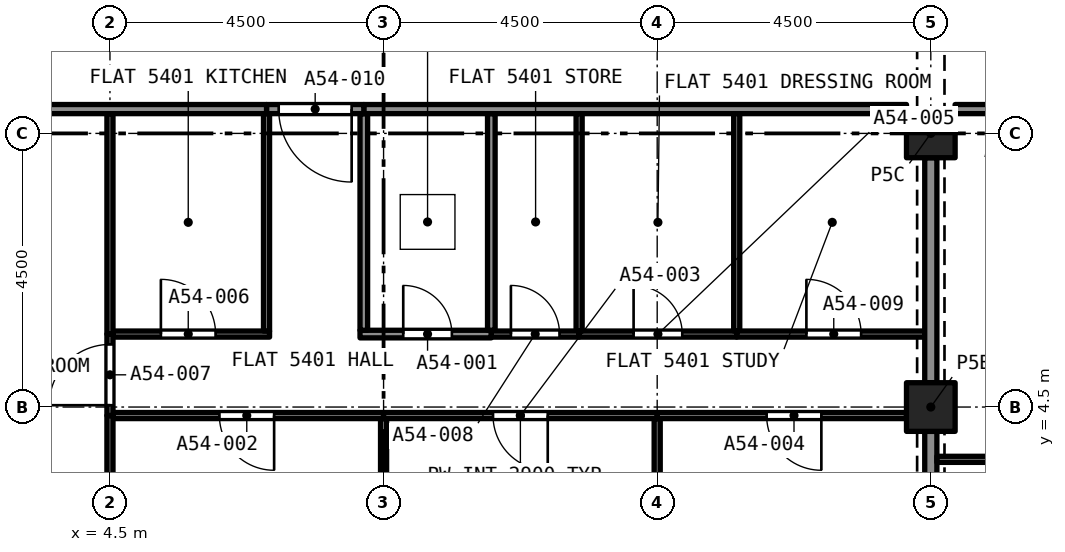
"""IFC4 building model, lengths in metres.
Left out: names, types, materials, properties, quantities, classifications, styles, units other than length and angle.
Written with IfcOpenShell. Run it as: python <this file> out.ifc"""

import sys

from ifc_helpers import new_model, si_unit, direction, frame, frame_2d, origin, origin_2d, place, context, subcontext, project, spatial, rectangle, extrude, element, fill, save


model = new_model("IFC4")
c1 = context("Model", 3, precision=1e-05, world=origin(), true_north=direction((0.0, 1.0)))
c2 = subcontext(c1, "Body", "Model", "MODEL_VIEW")
j1 = project(units=[si_unit("LENGTHUNIT", "METRE"), si_unit("PLANEANGLEUNIT", "RADIAN")], contexts=[c1])
p1 = place(None, origin())
s1 = spatial("IfcSite", under=j1, at=p1, CompositionType="ELEMENT")
p2 = place(p1, origin())
s2 = spatial("IfcBuilding", under=s1, at=p2, CompositionType="ELEMENT")
p3 = place(p2, frame((0.0, 0.0, 195.5)))
s3 = spatial("IfcBuildingStorey", under=s2, at=p3, CompositionType="ELEMENT", Elevation=195.5)
for number, where, z_axis, x_axis in (
    (1, (18.0, 4.5, 0.0), (0.0, 0.0, 1.0), (1.0, 0.0, 0.0)),
    (2, (18.0, 9.0, 0.0), (0.0, 0.0, 1.0), (1.0, 0.0, 0.0)),
):
    element("IfcColumn", number, at=place(p3, frame(where, z_axis=z_axis, x_axis=x_axis)), inside=s3, PredefinedType="COLUMN", context=c2, shape_type="SweptSolid", body=[
        extrude(rectangle(XDim=0.8, YDim=0.8, at=origin_2d()), origin(), (0.0, 0.0, 1.0), 3.2),
    ])
p4 = place(p3, frame((8.613, 5.7, 0.0), z_axis=(0.0, 0.0, 1.0), x_axis=(1.0, 0.0, 0.0)))
e3 = element("IfcWall", 3, at=p4, inside=s3, PredefinedType="PARTITIONING", context=c2, shape_type="SweptSolid", body=[
    extrude(rectangle(XDim=2.159, YDim=0.125, at=frame_2d((1.08, 0.0))), origin(), (0.0, 0.0, 1.0), 2.9),
])
p5 = place(p4, frame((0.711, 0.0, 0.0)))
e4 = element("IfcOpeningElement", 4, at=p5, cuts=e3, PredefinedType="OPENING", context=c2, shape_type="SweptSolid", body=[
    extrude(rectangle(XDim=0.8, YDim=2.1, at=frame_2d((0.4, 1.05))), frame((0.0, 0.073, 0.0), z_axis=(0.0, -1.0, 0.0), x_axis=(1.0, 0.0, 0.0)), (0.0, 0.0, 1.0), 0.145),
])
for number, where, z_axis, x_axis in (
    (5, (8.675, 5.762, 0.0), (0.0, 0.0, 1.0), (0.0, 1.0, 0.0)),
    (6, (10.772, 5.762, 0.0), (0.0, 0.0, 1.0), (0.0, 1.0, 0.0)),
):
    element("IfcWall", number, at=place(p3, frame(where, z_axis=z_axis, x_axis=x_axis)), inside=s3, PredefinedType="PARTITIONING", context=c2, shape_type="SweptSolid", body=[
        extrude(rectangle(XDim=3.562, YDim=0.125, at=frame_2d((1.781, 0.0))), origin(), (0.0, 0.0, 1.0), 2.9),
    ])
p6 = place(p3, frame((8.675, 9.4, 0.0), z_axis=(0.0, 0.0, 1.0), x_axis=(1.0, 0.0, 0.0)))
e7 = element("IfcWall", 7, at=p6, inside=s3, PredefinedType="PARTITIONING", context=c2, shape_type="SweptSolid", body=[
    extrude(rectangle(XDim=8.925, YDim=0.15, at=frame_2d((4.462, 0.0))), origin(), (0.0, 0.0, 1.0), 2.9),
])
p7 = place(p3, frame((9.0, 0.4, 0.0), z_axis=(0.0, 0.0, 1.0), x_axis=(0.0, 1.0, 0.0)))
e8 = element("IfcWall", 8, at=p7, inside=s3, PredefinedType="PARTITIONING", context=c2, shape_type="SweptSolid", body=[
    extrude(rectangle(XDim=3.91, YDim=0.1, at=frame_2d((1.955, 0.0))), origin(), (0.0, 0.0, 1.0), 2.9),
])
p8 = place(p3, frame((9.0, 4.36, 0.0), z_axis=(0.0, 0.0, 1.0), x_axis=(-1.0, 0.0, 0.0)))
e9 = element("IfcWall", 9, at=p8, inside=s3, PredefinedType="PARTITIONING", context=c2, shape_type="SweptSolid", body=[
    extrude(rectangle(XDim=4.45, YDim=0.1, at=frame_2d((2.225, 0.0))), origin(), (0.0, 0.0, 1.0), 2.9),
])
p9 = place(p8, frame((1.8, 0.0, 0.0)))
e10 = element("IfcOpeningElement", 10, at=p9, cuts=e9, PredefinedType="OPENING", context=c2, shape_type="SweptSolid", body=[
    extrude(rectangle(XDim=0.9, YDim=2.1, at=frame_2d((0.45, 1.05))), frame((0.0, 0.06, 0.0), z_axis=(0.0, -1.0, 0.0), x_axis=(1.0, 0.0, 0.0)), (0.0, 0.0, 1.0), 0.12),
])
p10 = place(p3, frame((4.5, 0.433, 0.0), z_axis=(0.0, 0.0, 1.0), x_axis=(0.0, 1.0, 0.0)))
e11 = element("IfcWall", 11, at=p10, inside=s3, PredefinedType="PARTITIONING", context=c2, shape_type="SweptSolid", body=[
    extrude(rectangle(XDim=3.927, YDim=0.1, at=frame_2d((1.964, 0.0))), origin(), (0.0, 0.0, 1.0), 2.9),
])
p11 = place(p3, frame((13.5, 0.4, 0.0), z_axis=(0.0, 0.0, 1.0), x_axis=(0.0, 1.0, 0.0)))
e12 = element("IfcWall", 12, at=p11, inside=s3, PredefinedType="PARTITIONING", context=c2, shape_type="SweptSolid", body=[
    extrude(rectangle(XDim=3.91, YDim=0.1, at=frame_2d((1.955, 0.0))), origin(), (0.0, 0.0, 1.0), 2.9),
])
p12 = place(p3, frame((13.5, 4.36, 0.0), z_axis=(0.0, 0.0, 1.0), x_axis=(-1.0, 0.0, 0.0)))
e13 = element("IfcWall", 13, at=p12, inside=s3, PredefinedType="PARTITIONING", context=c2, shape_type="SweptSolid", body=[
    extrude(rectangle(XDim=4.5, YDim=0.1, at=frame_2d((2.25, 0.0))), origin(), (0.0, 0.0, 1.0), 2.9),
])
p13 = place(p12, frame((1.8, 0.0, 0.0)))
e14 = element("IfcOpeningElement", 14, at=p13, cuts=e13, PredefinedType="OPENING", context=c2, shape_type="SweptSolid", body=[
    extrude(rectangle(XDim=0.9, YDim=2.1, at=frame_2d((0.45, 1.05))), frame((0.0, 0.06, 0.0), z_axis=(0.0, -1.0, 0.0), x_axis=(1.0, 0.0, 0.0)), (0.0, 0.0, 1.0), 0.12),
])
p14 = place(p3, frame((17.6, 4.36, 0.0), z_axis=(0.0, 0.0, 1.0), x_axis=(-1.0, 0.0, 0.0)))
e15 = element("IfcWall", 15, at=p14, inside=s3, PredefinedType="PARTITIONING", context=c2, shape_type="SweptSolid", body=[
    extrude(rectangle(XDim=4.1, YDim=0.1, at=frame_2d((2.05, 0.0))), origin(), (0.0, 0.0, 1.0), 2.9),
])
p15 = place(p14, frame((1.4, 0.0, 0.0)))
e16 = element("IfcOpeningElement", 16, at=p15, cuts=e15, PredefinedType="OPENING", context=c2, shape_type="SweptSolid", body=[
    extrude(rectangle(XDim=0.9, YDim=2.1, at=frame_2d((0.45, 1.05))), frame((0.0, 0.06, 0.0), z_axis=(0.0, -1.0, 0.0), x_axis=(1.0, 0.0, 0.0)), (0.0, 0.0, 1.0), 0.12),
])
p16 = place(p3, frame((18.0, 0.4, 0.0), z_axis=(0.0, 0.0, 1.0), x_axis=(0.0, 1.0, 0.0)))
e17 = element("IfcWall", 17, at=p16, inside=s3, PredefinedType="PARTITIONING", context=c2, shape_type="SweptSolid", body=[
    extrude(rectangle(XDim=3.7, YDim=0.2, at=frame_2d((1.85, 0.0))), origin(), (0.0, 0.0, 1.0), 2.38),
])
p17 = place(p3, frame((12.216, 5.7, 0.0), z_axis=(0.0, 0.0, 1.0), x_axis=(1.0, 0.0, 0.0)))
e18 = element("IfcWall", 18, at=p17, inside=s3, PredefinedType="PARTITIONING", context=c2, shape_type="SweptSolid", body=[
    extrude(rectangle(XDim=2.591, YDim=0.1, at=frame_2d((1.296, 0.0))), origin(), (0.0, 0.0, 1.0), 2.9),
])
p18 = place(p17, frame((0.896, 0.0, 0.0)))
e19 = element("IfcOpeningElement", 19, at=p18, cuts=e18, PredefinedType="OPENING", context=c2, shape_type="SweptSolid", body=[
    extrude(rectangle(XDim=0.8, YDim=2.1, at=frame_2d((0.4, 1.05))), frame((0.0, 0.06, 0.0), z_axis=(0.0, -1.0, 0.0), x_axis=(1.0, 0.0, 0.0)), (0.0, 0.0, 1.0), 0.12),
])
for number, where, z_axis, x_axis in (
    (20, (12.216, 5.75, 0.0), (0.0, 0.0, 1.0), (0.0, 1.0, 0.0)),
    (21, (14.808, 5.75, 0.0), (0.0, 0.0, 1.0), (0.0, 1.0, 0.0)),
):
    element("IfcWall", number, at=place(p3, frame(where, z_axis=z_axis, x_axis=x_axis)), inside=s3, PredefinedType="PARTITIONING", context=c2, shape_type="SweptSolid", body=[
        extrude(rectangle(XDim=3.575, YDim=0.1, at=frame_2d((1.788, 0.0))), origin(), (0.0, 0.0, 1.0), 2.9),
    ])
p19 = place(p3, frame((4.55, 5.7, 0.0), z_axis=(0.0, 0.0, 1.0), x_axis=(1.0, 0.0, 0.0)))
e22 = element("IfcWall", 22, at=p19, inside=s3, PredefinedType="PARTITIONING", context=c2, shape_type="SweptSolid", body=[
    extrude(rectangle(XDim=2.575, YDim=0.1, at=frame_2d((1.288, 0.0))), origin(), (0.0, 0.0, 1.0), 2.9),
])
p20 = place(p19, frame((0.788, 0.0, 0.0)))
e23 = element("IfcOpeningElement", 23, at=p20, cuts=e22, PredefinedType="OPENING", context=c2, shape_type="SweptSolid", body=[
    extrude(rectangle(XDim=0.9, YDim=2.1, at=frame_2d((0.45, 1.05))), frame((0.0, 0.06, 0.0), z_axis=(0.0, -1.0, 0.0), x_axis=(1.0, 0.0, 0.0)), (0.0, 0.0, 1.0), 0.12),
])
p21 = place(p3, frame((7.075, 5.75, 0.0), z_axis=(0.0, 0.0, 1.0), x_axis=(0.0, 1.0, 0.0)))
e24 = element("IfcWall", 24, at=p21, inside=s3, PredefinedType="PARTITIONING", context=c2, shape_type="SweptSolid", body=[
    extrude(rectangle(XDim=3.575, YDim=0.1, at=frame_2d((1.788, 0.0))), origin(), (0.0, 0.0, 1.0), 2.9),
])
p22 = place(p3, frame((4.5, 4.36, 0.0), z_axis=(0.0, 0.0, 1.0), x_axis=(0.0, 1.0, 0.0)))
e25 = element("IfcWall", 25, at=p22, inside=s3, PredefinedType="PARTITIONING", context=c2, shape_type="SweptSolid", body=[
    extrude(rectangle(XDim=1.34, YDim=0.1, at=frame_2d((0.67, 0.0))), origin(), (0.0, 0.0, 1.0), 2.9),
])
p23 = place(p22, frame((0.17, 0.0, 0.0)))
e26 = element("IfcOpeningElement", 26, at=p23, cuts=e25, PredefinedType="OPENING", context=c2, shape_type="SweptSolid", body=[
    extrude(rectangle(XDim=1.0, YDim=2.1, at=frame_2d((0.5, 1.05))), frame((0.0, 0.06, 0.0), z_axis=(0.0, -1.0, 0.0), x_axis=(1.0, 0.0, 0.0)), (0.0, 0.0, 1.0), 0.12),
])
p24 = place(p3, frame((10.772, 5.7, 0.0), z_axis=(0.0, 0.0, 1.0), x_axis=(1.0, 0.0, 0.0)))
e27 = element("IfcWall", 27, at=p24, inside=s3, PredefinedType="PARTITIONING", context=c2, shape_type="SweptSolid", body=[
    extrude(rectangle(XDim=1.445, YDim=0.1, at=frame_2d((0.722, 0.0))), origin(), (0.0, 0.0, 1.0), 2.9),
])
p25 = place(p24, frame((0.322, 0.0, 0.0)))
e28 = element("IfcOpeningElement", 28, at=p25, cuts=e27, PredefinedType="OPENING", context=c2, shape_type="SweptSolid", body=[
    extrude(rectangle(XDim=0.8, YDim=2.1, at=frame_2d((0.4, 1.05))), frame((0.0, 0.06, 0.0), z_axis=(0.0, -1.0, 0.0), x_axis=(1.0, 0.0, 0.0)), (0.0, 0.0, 1.0), 0.12),
])
p26 = place(p3, frame((14.808, 5.7, 0.0), z_axis=(0.0, 0.0, 1.0), x_axis=(1.0, 0.0, 0.0)))
e29 = element("IfcWall", 29, at=p26, inside=s3, PredefinedType="PARTITIONING", context=c2, shape_type="SweptSolid", body=[
    extrude(rectangle(XDim=3.092, YDim=0.1, at=frame_2d((1.546, 0.0))), origin(), (0.0, 0.0, 1.0), 2.9),
])
p27 = place(p26, frame((1.146, 0.0, 0.0)))
e30 = element("IfcOpeningElement", 30, at=p27, cuts=e29, PredefinedType="OPENING", context=c2, shape_type="SweptSolid", body=[
    extrude(rectangle(XDim=0.9, YDim=2.1, at=frame_2d((0.45, 1.05))), frame((0.0, 0.06, 0.0), z_axis=(0.0, -1.0, 0.0), x_axis=(1.0, 0.0, 0.0)), (0.0, 0.0, 1.0), 0.12),
])
p28 = place(p3, frame((18.0, 4.9, 0.0), z_axis=(0.0, 0.0, 1.0), x_axis=(0.0, 1.0, 0.0)))
e31 = element("IfcWall", 31, at=p28, inside=s3, PredefinedType="PARTITIONING", context=c2, shape_type="SweptSolid", body=[
    extrude(rectangle(XDim=3.7, YDim=0.2, at=frame_2d((1.85, 0.0))), origin(), (0.0, 0.0, 1.0), 2.38),
])
p29 = place(p3, frame((8.675, 9.4, 0.0), z_axis=(0.0, 0.0, 1.0), x_axis=(-1.0, 0.0, 0.0)))
e32 = element("IfcWall", 32, at=p29, inside=s3, PredefinedType="PARTITIONING", context=c2, shape_type="SweptSolid", body=[
    extrude(rectangle(XDim=1.6, YDim=0.15, at=frame_2d((0.8, 0.0))), origin(), (0.0, 0.0, 1.0), 2.9),
])
p30 = place(p29, frame((0.2, 0.0, 0.0)))
e33 = element("IfcOpeningElement", 33, at=p30, cuts=e32, PredefinedType="OPENING", context=c2, shape_type="SweptSolid", body=[
    extrude(rectangle(XDim=1.2, YDim=2.4, at=frame_2d((0.6, 1.2))), frame((0.0, 0.085, 0.0), z_axis=(0.0, -1.0, 0.0), x_axis=(1.0, 0.0, 0.0)), (0.0, 0.0, 1.0), 0.17),
])
p31 = place(p3, frame((4.5, 5.7, 0.0), z_axis=(0.0, 0.0, 1.0), x_axis=(0.0, 1.0, 0.0)))
e34 = element("IfcWall", 34, at=p31, inside=s3, PredefinedType="PARTITIONING", context=c2, shape_type="SweptSolid", body=[
    extrude(rectangle(XDim=3.625, YDim=0.1, at=frame_2d((1.812, 0.0))), origin(), (0.0, 0.0, 1.0), 2.9),
])
p32 = place(p3, frame((0.4, 9.4, 0.0), z_axis=(0.0, 0.0, 1.0), x_axis=(1.0, 0.0, 0.0)))
e35 = element("IfcWall", 35, at=p32, inside=s3, PredefinedType="PARTITIONING", context=c2, shape_type="SweptSolid", body=[
    extrude(rectangle(XDim=6.675, YDim=0.15, at=frame_2d((3.337, 0.0))), origin(), (0.0, 0.0, 1.0), 2.9),
])
p33 = place(p3, frame((22.5, 3.64, 0.0), z_axis=(0.0, 0.0, 1.0), x_axis=(-1.0, 0.0, 0.0)))
e36 = element("IfcWall", 36, at=p33, inside=s3, PredefinedType="PARTITIONING", context=c2, shape_type="SweptSolid", body=[
    extrude(rectangle(XDim=4.4, YDim=0.1, at=frame_2d((2.2, 0.0))), origin(), (0.0, 0.0, 1.0), 2.75),
])
p34 = place(p33, frame((1.8, 0.0, 0.0)))
e37 = element("IfcOpeningElement", 37, at=p34, cuts=e36, PredefinedType="OPENING", context=c2, shape_type="SweptSolid", body=[
    extrude(rectangle(XDim=0.9, YDim=2.1, at=frame_2d((0.45, 1.05))), frame((0.0, 0.06, 0.0), z_axis=(0.0, -1.0, 0.0), x_axis=(1.0, 0.0, 0.0)), (0.0, 0.0, 1.0), 0.12),
])
p35 = place(p3, frame((21.05, 9.4, 0.0), z_axis=(0.0, 0.0, 1.0), x_axis=(-1.0, 0.0, 0.0)))
e38 = element("IfcWall", 38, at=p35, inside=s3, PredefinedType="PARTITIONING", context=c2, shape_type="SweptSolid", body=[
    extrude(rectangle(XDim=2.65, YDim=0.15, at=frame_2d((1.325, 0.0))), origin(), (0.0, 0.0, 1.0), 2.75),
])
p36 = place(p35, frame((0.2, 0.0, 0.0)))
e39 = element("IfcOpeningElement", 39, at=p36, cuts=e38, PredefinedType="OPENING", context=c2, shape_type="SweptSolid", body=[
    extrude(rectangle(XDim=1.2, YDim=2.4, at=frame_2d((0.6, 1.2))), frame((0.0, 0.085, 0.0), z_axis=(0.0, -1.0, 0.0), x_axis=(1.0, 0.0, 0.0)), (0.0, 0.0, 1.0), 0.17),
])
p37 = place(p5, origin())
e40 = element("IfcDoor", 40, at=p37, inside=s3, OperationType="SINGLE_SWING_RIGHT", PredefinedType="DOOR", context=c2, shape_type="SweptSolid", body=[
    extrude(rectangle(XDim=0.8, YDim=2.1, at=frame_2d((0.4, 1.05))), frame((0.0, 0.025, 0.0), z_axis=(0.0, -1.0, 0.0), x_axis=(1.0, 0.0, 0.0)), (0.0, 0.0, 1.0), 0.05),
])
fill(e4, e40)
p38 = place(p9, origin())
e41 = element("IfcDoor", 41, at=p38, inside=s3, OperationType="SINGLE_SWING_RIGHT", PredefinedType="DOOR", context=c2, shape_type="SweptSolid", body=[
    extrude(rectangle(XDim=0.9, YDim=2.1, at=frame_2d((0.45, 1.05))), frame((0.0, 0.025, 0.0), z_axis=(0.0, -1.0, 0.0), x_axis=(1.0, 0.0, 0.0)), (0.0, 0.0, 1.0), 0.05),
])
fill(e10, e41)
p39 = place(p13, origin())
e42 = element("IfcDoor", 42, at=p39, inside=s3, OperationType="SINGLE_SWING_LEFT", PredefinedType="DOOR", context=c2, shape_type="SweptSolid", body=[
    extrude(rectangle(XDim=0.9, YDim=2.1, at=frame_2d((0.45, 1.05))), frame((0.0, 0.025, 0.0), z_axis=(0.0, -1.0, 0.0), x_axis=(1.0, 0.0, 0.0)), (0.0, 0.0, 1.0), 0.05),
])
fill(e14, e42)
p40 = place(p15, origin())
e43 = element("IfcDoor", 43, at=p40, inside=s3, OperationType="SINGLE_SWING_LEFT", PredefinedType="DOOR", context=c2, shape_type="SweptSolid", body=[
    extrude(rectangle(XDim=0.9, YDim=2.1, at=frame_2d((0.45, 1.05))), frame((0.0, 0.025, 0.0), z_axis=(0.0, -1.0, 0.0), x_axis=(1.0, 0.0, 0.0)), (0.0, 0.0, 1.0), 0.05),
])
fill(e16, e43)
p41 = place(p18, origin())
e44 = element("IfcDoor", 44, at=p41, inside=s3, OperationType="SINGLE_SWING_LEFT", PredefinedType="DOOR", context=c2, shape_type="SweptSolid", body=[
    extrude(rectangle(XDim=0.8, YDim=2.1, at=frame_2d((0.4, 1.05))), frame((0.0, 0.025, 0.0), z_axis=(0.0, -1.0, 0.0), x_axis=(1.0, 0.0, 0.0)), (0.0, 0.0, 1.0), 0.05),
])
fill(e19, e44)
p42 = place(p20, origin())
e45 = element("IfcDoor", 45, at=p42, inside=s3, OperationType="SINGLE_SWING_LEFT", PredefinedType="DOOR", context=c2, shape_type="SweptSolid", body=[
    extrude(rectangle(XDim=0.9, YDim=2.1, at=frame_2d((0.45, 1.05))), frame((0.0, 0.025, 0.0), z_axis=(0.0, -1.0, 0.0), x_axis=(1.0, 0.0, 0.0)), (0.0, 0.0, 1.0), 0.05),
])
fill(e23, e45)
p43 = place(p23, origin())
e46 = element("IfcDoor", 46, at=p43, inside=s3, OperationType="SINGLE_SWING_RIGHT", PredefinedType="DOOR", context=c2, shape_type="SweptSolid", body=[
    extrude(rectangle(XDim=1.0, YDim=2.1, at=frame_2d((0.5, 1.05))), frame((0.0, 0.025, 0.0), z_axis=(0.0, -1.0, 0.0), x_axis=(1.0, 0.0, 0.0)), (0.0, 0.0, 1.0), 0.05),
])
fill(e26, e46)
p44 = place(p25, origin())
e47 = element("IfcDoor", 47, at=p44, inside=s3, OperationType="SINGLE_SWING_RIGHT", PredefinedType="DOOR", context=c2, shape_type="SweptSolid", body=[
    extrude(rectangle(XDim=0.8, YDim=2.1, at=frame_2d((0.4, 1.05))), frame((0.0, 0.025, 0.0), z_axis=(0.0, -1.0, 0.0), x_axis=(1.0, 0.0, 0.0)), (0.0, 0.0, 1.0), 0.05),
])
fill(e28, e47)
p45 = place(p27, origin())
e48 = element("IfcDoor", 48, at=p45, inside=s3, OperationType="SINGLE_SWING_RIGHT", PredefinedType="DOOR", context=c2, shape_type="SweptSolid", body=[
    extrude(rectangle(XDim=0.9, YDim=2.1, at=frame_2d((0.45, 1.05))), frame((0.0, 0.025, 0.0), z_axis=(0.0, -1.0, 0.0), x_axis=(1.0, 0.0, 0.0)), (0.0, 0.0, 1.0), 0.05),
])
fill(e30, e48)
p46 = place(p30, origin())
e49 = element("IfcDoor", 49, at=p46, inside=s3, OperationType="SINGLE_SWING_RIGHT", PredefinedType="DOOR", context=c2, shape_type="SweptSolid", body=[
    extrude(rectangle(XDim=1.2, YDim=2.4, at=frame_2d((0.6, 1.2))), frame((0.0, 0.025, 0.0), z_axis=(0.0, -1.0, 0.0), x_axis=(1.0, 0.0, 0.0)), (0.0, 0.0, 1.0), 0.05),
])
fill(e33, e49)
save(model, sys.argv[1])
